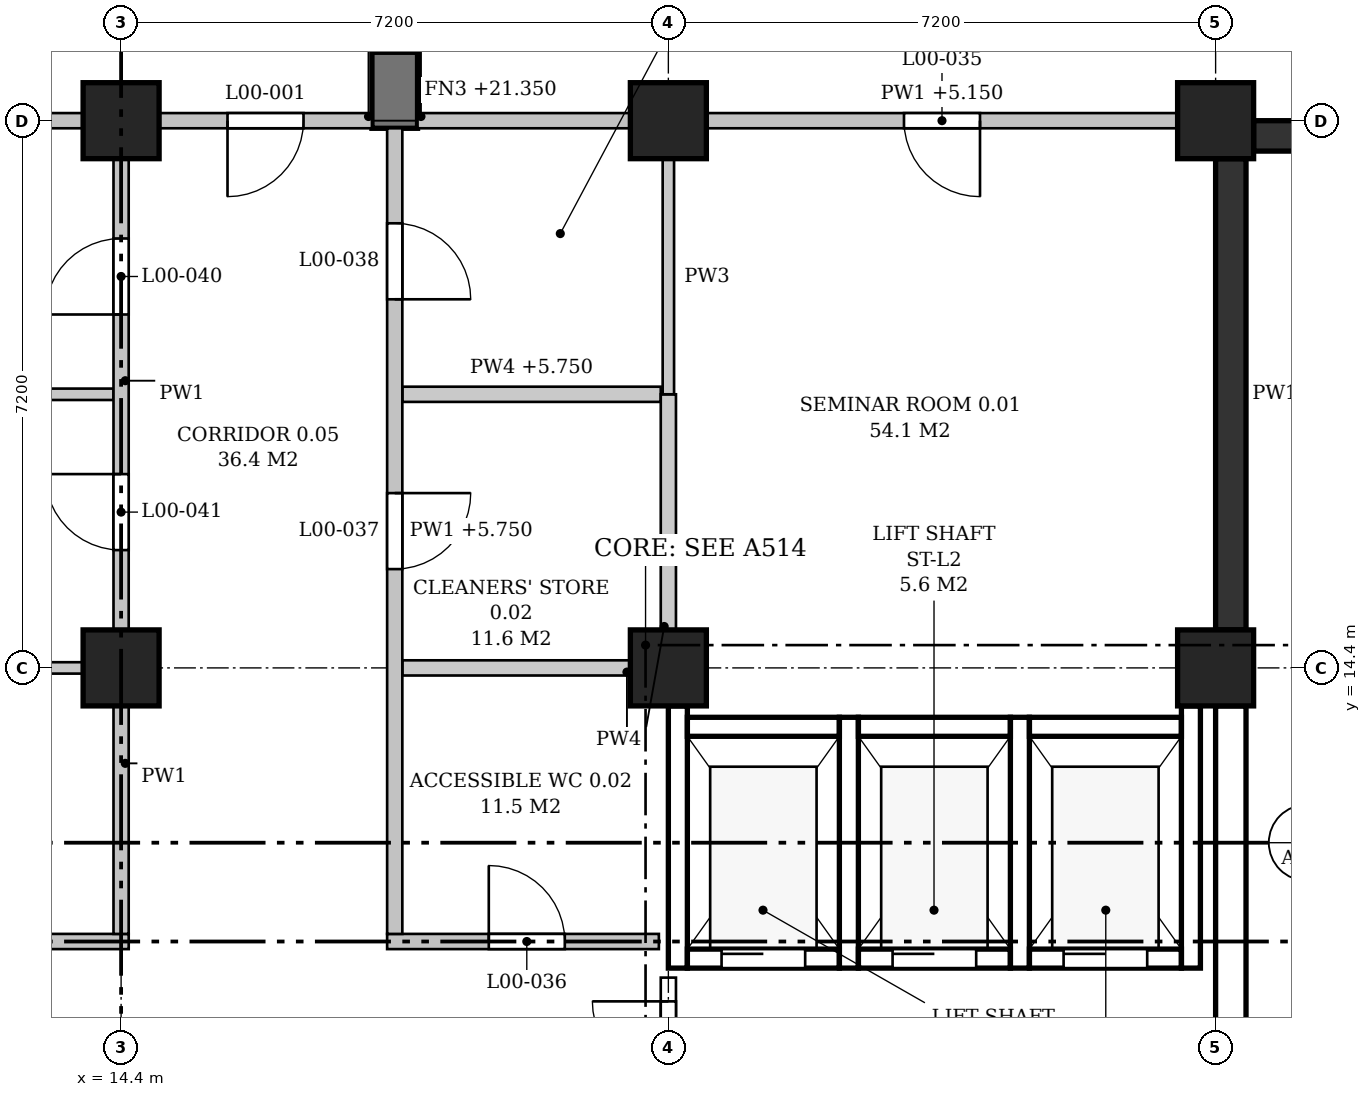
"""IFC4 building model, lengths in metres.
Left out: names, types, materials, properties, quantities, classifications, styles, units other than length and angle.
Written with IfcOpenShell. Run it as: python <this file> out.ifc"""

import sys

from ifc_helpers import new_model, si_unit, direction, frame, frame_2d, origin, origin_2d, place, context, subcontext, project, spatial, polyline, rectangle, outline, extrude, element, fill, save


model = new_model("IFC4")
c1 = context("Model", 3, precision=1e-05, world=origin(), true_north=direction((0.0, 1.0)))
c2 = subcontext(c1, "Body", "Model", "MODEL_VIEW")
j1 = project(units=[si_unit("LENGTHUNIT", "METRE"), si_unit("PLANEANGLEUNIT", "RADIAN")], contexts=[c1])
p1 = place(None, origin())
s1 = spatial("IfcSite", under=j1, at=p1, CompositionType="ELEMENT")
p2 = place(p1, origin())
s2 = spatial("IfcBuilding", under=s1, at=p2, CompositionType="ELEMENT")
p3 = place(p2, origin())
s3 = spatial("IfcBuildingStorey", under=s2, at=p3, CompositionType="ELEMENT", Elevation=0.0)
for number, where, z_axis, x_axis in (
    (1, (14.4, 14.4, 0.0), (0.0, 0.0, 1.0), (1.0, 0.0, 0.0)),
    (2, (14.4, 21.6, 0.0), (0.0, 0.0, 1.0), (1.0, 0.0, 0.0)),
    (3, (21.6, 14.4, 0.0), (0.0, 0.0, 1.0), (1.0, 0.0, 0.0)),
    (4, (21.6, 21.6, 0.0), (0.0, 0.0, 1.0), (1.0, 0.0, 0.0)),
    (5, (28.8, 14.4, 0.0), (0.0, 0.0, 1.0), (1.0, 0.0, 0.0)),
    (6, (28.8, 21.6, 0.0), (0.0, 0.0, 1.0), (1.0, 0.0, 0.0)),
):
    element("IfcColumn", number, at=place(p3, frame(where, z_axis=z_axis, x_axis=x_axis)), inside=s3, PredefinedType="COLUMN", context=c2, shape_type="SweptSolid", body=[
        extrude(rectangle(XDim=1.0, YDim=1.0, at=origin_2d()), origin(), (0.0, 0.0, 1.0), 6.0),
    ])
p4 = place(p3, frame((18.0, 21.5, 0.0), z_axis=(0.0, 0.0, 1.0), x_axis=(0.0, 1.0, 0.0)))
e7 = element("IfcWall", 7, at=p4, inside=s3, PredefinedType="POLYGONAL", context=c2, shape_type="SweptSolid", body=[
    extrude(outline(polyline([(1.0, 0.0), (1.0, 20.975), (0.75, 21.35), (0.35, 21.35), (0.35, 20.75), (0.0, 20.75), (0.0, 16.8), (0.35, 16.8), (0.35, 15.95), (0.0, 15.95), (0.0, 11.4), (0.35, 11.4), (0.35, 10.55), (0.0, 10.55), (0.0, 6.0), (0.35, 6.0), (0.35, 0.0), (1.0, 0.0)])), frame((0.0, 0.3, 0.0), z_axis=(0.0, -1.0, 0.0), x_axis=(1.0, 0.0, 0.0)), (0.0, 0.0, 1.0), 0.6),
])
p5 = place(p3, frame((21.725, 10.45, -0.3), z_axis=(0.0, 0.0, 1.0), x_axis=(0.0, 1.0, 0.0)))
e8 = element("IfcWall", 8, at=p5, inside=s3, PredefinedType="SHEAR", context=c2, shape_type="SweptSolid", body=[
    extrude(rectangle(XDim=3.45, YDim=0.25, at=frame_2d((1.725, 0.0))), origin(), (0.0, 0.0, 1.0), 5.3),
])
for number, where, z_axis, x_axis in (
    (9, (23.975, 10.45, -0.3), (0.0, 0.0, 1.0), (0.0, 1.0, 0.0)),
    (10, (26.225, 10.45, -0.3), (0.0, 0.0, 1.0), (0.0, 1.0, 0.0)),
):
    element("IfcWall", number, at=place(p3, frame(where, z_axis=z_axis, x_axis=x_axis)), inside=s3, PredefinedType="SHEAR", context=c2, shape_type="SweptSolid", body=[
        extrude(rectangle(XDim=3.3, YDim=0.25, at=frame_2d((1.65, 0.0))), origin(), (0.0, 0.0, 1.0), 6.05),
    ])
p6 = place(p3, frame((28.475, 10.45, -0.3), z_axis=(0.0, 0.0, 1.0), x_axis=(0.0, 1.0, 0.0)))
e11 = element("IfcWall", 11, at=p6, inside=s3, PredefinedType="SHEAR", context=c2, shape_type="SweptSolid", body=[
    extrude(rectangle(XDim=3.45, YDim=0.25, at=frame_2d((1.725, 0.0))), origin(), (0.0, 0.0, 1.0), 5.35),
])
p7 = place(p3, frame((21.85, 10.575, -0.3), z_axis=(0.0, 0.0, 1.0), x_axis=(1.0, 0.0, 0.0)))
e12 = element("IfcWall", 12, at=p7, inside=s3, PredefinedType="SHEAR", context=c2, shape_type="SweptSolid", body=[
    extrude(rectangle(XDim=2.0, YDim=0.25, at=frame_2d((1.0, 0.0))), origin(), (0.0, 0.0, 1.0), 6.05),
])
p8 = place(p7, frame((0.45, 0.0, 0.3)))
e13 = element("IfcOpeningElement", 13, at=p8, cuts=e12, PredefinedType="OPENING", context=c2, shape_type="SweptSolid", body=[
    extrude(rectangle(XDim=1.1, YDim=2.1, at=frame_2d((0.55, 1.05))), frame((0.0, 0.135, 0.0), z_axis=(0.0, -1.0, 0.0), x_axis=(1.0, 0.0, 0.0)), (0.0, 0.0, 1.0), 0.27),
])
p9 = place(p3, frame((21.85, 13.625, -0.3), z_axis=(0.0, 0.0, 1.0), x_axis=(1.0, 0.0, 0.0)))
e14 = element("IfcWall", 14, at=p9, inside=s3, PredefinedType="SHEAR", context=c2, shape_type="SweptSolid", body=[
    extrude(rectangle(XDim=2.0, YDim=0.25, at=frame_2d((1.0, 0.0))), origin(), (0.0, 0.0, 1.0), 6.05),
])
p10 = place(p3, frame((24.1, 10.575, -0.3), z_axis=(0.0, 0.0, 1.0), x_axis=(1.0, 0.0, 0.0)))
e15 = element("IfcWall", 15, at=p10, inside=s3, PredefinedType="SHEAR", context=c2, shape_type="SweptSolid", body=[
    extrude(rectangle(XDim=2.0, YDim=0.25, at=frame_2d((1.0, 0.0))), origin(), (0.0, 0.0, 1.0), 6.05),
])
p11 = place(p10, frame((0.45, 0.0, 0.3)))
e16 = element("IfcOpeningElement", 16, at=p11, cuts=e15, PredefinedType="OPENING", context=c2, shape_type="SweptSolid", body=[
    extrude(rectangle(XDim=1.1, YDim=2.1, at=frame_2d((0.55, 1.05))), frame((0.0, 0.135, 0.0), z_axis=(0.0, -1.0, 0.0), x_axis=(1.0, 0.0, 0.0)), (0.0, 0.0, 1.0), 0.27),
])
p12 = place(p3, frame((24.1, 13.625, -0.3), z_axis=(0.0, 0.0, 1.0), x_axis=(1.0, 0.0, 0.0)))
e17 = element("IfcWall", 17, at=p12, inside=s3, PredefinedType="SHEAR", context=c2, shape_type="SweptSolid", body=[
    extrude(rectangle(XDim=2.0, YDim=0.25, at=frame_2d((1.0, 0.0))), origin(), (0.0, 0.0, 1.0), 6.05),
])
p13 = place(p3, frame((26.35, 10.575, -0.3), z_axis=(0.0, 0.0, 1.0), x_axis=(1.0, 0.0, 0.0)))
e18 = element("IfcWall", 18, at=p13, inside=s3, PredefinedType="SHEAR", context=c2, shape_type="SweptSolid", body=[
    extrude(rectangle(XDim=2.0, YDim=0.25, at=frame_2d((1.0, 0.0))), origin(), (0.0, 0.0, 1.0), 6.05),
])
p14 = place(p13, frame((0.45, 0.0, 0.3)))
e19 = element("IfcOpeningElement", 19, at=p14, cuts=e18, PredefinedType="OPENING", context=c2, shape_type="SweptSolid", body=[
    extrude(rectangle(XDim=1.1, YDim=2.1, at=frame_2d((0.55, 1.05))), frame((0.0, 0.135, 0.0), z_axis=(0.0, -1.0, 0.0), x_axis=(1.0, 0.0, 0.0)), (0.0, 0.0, 1.0), 0.27),
])
p15 = place(p3, frame((26.35, 13.625, -0.3), z_axis=(0.0, 0.0, 1.0), x_axis=(1.0, 0.0, 0.0)))
e20 = element("IfcWall", 20, at=p15, inside=s3, PredefinedType="SHEAR", context=c2, shape_type="SweptSolid", body=[
    extrude(rectangle(XDim=2.0, YDim=0.25, at=frame_2d((1.0, 0.0))), origin(), (0.0, 0.0, 1.0), 6.05),
])
p16 = place(p3, frame((7.35, 10.8, 0.0), z_axis=(0.0, 0.0, 1.0), x_axis=(1.0, 0.0, 0.0)))
e21 = element("IfcWall", 21, at=p16, inside=s3, PredefinedType="PARTITIONING", context=c2, shape_type="SweptSolid", body=[
    extrude(outline(polyline([(0.0, 0.0), (7.15, 0.0), (7.15, 5.0), (6.8, 5.0), (6.8, 5.75), (0.1, 5.75), (0.1, 5.0), (0.0, 5.0), (0.0, 0.0)])), frame((0.0, 0.1, 0.0), z_axis=(0.0, -1.0, 0.0), x_axis=(1.0, 0.0, 0.0)), (0.0, 0.0, 1.0), 0.2),
])
p17 = place(p16, frame((2.525, 0.0, 0.0)))
e22 = element("IfcOpeningElement", 22, at=p17, cuts=e21, PredefinedType="OPENING", context=c2, shape_type="SweptSolid", body=[
    extrude(rectangle(XDim=2.0, YDim=2.1, at=frame_2d((1.0, 1.05))), frame((0.0, 0.11, 0.0), z_axis=(0.0, -1.0, 0.0), x_axis=(1.0, 0.0, 0.0)), (0.0, 0.0, 1.0), 0.22),
])
p18 = place(p3, frame((17.9, 10.8, 0.0), z_axis=(0.0, 0.0, 1.0), x_axis=(1.0, 0.0, 0.0)))
e23 = element("IfcWall", 23, at=p18, inside=s3, PredefinedType="PARTITIONING", context=c2, shape_type="SweptSolid", body=[
    extrude(outline(polyline([(0.0, 0.0), (3.575, 0.0), (3.575, 5.0), (3.45, 5.0), (3.45, 5.75), (0.0, 5.75), (0.0, 0.0)])), frame((0.0, 0.1, 0.0), z_axis=(0.0, -1.0, 0.0), x_axis=(1.0, 0.0, 0.0)), (0.0, 0.0, 1.0), 0.2),
])
p19 = place(p18, frame((1.338, 0.0, 0.0)))
e24 = element("IfcOpeningElement", 24, at=p19, cuts=e23, PredefinedType="OPENING", context=c2, shape_type="SweptSolid", body=[
    extrude(rectangle(XDim=1.0, YDim=2.1, at=frame_2d((0.5, 1.05))), frame((0.0, 0.11, 0.0), z_axis=(0.0, -1.0, 0.0), x_axis=(1.0, 0.0, 0.0)), (0.0, 0.0, 1.0), 0.22),
])
p20 = place(p3, frame((7.7, 14.4, 0.0), z_axis=(0.0, 0.0, 1.0), x_axis=(1.0, 0.0, 0.0)))
e25 = element("IfcWall", 25, at=p20, inside=s3, PredefinedType="PARTITIONING", context=c2, shape_type="SweptSolid", body=[
    extrude(rectangle(XDim=6.2, YDim=0.15, at=frame_2d((3.1, 0.0))), origin(), (0.0, 0.0, 1.0), 5.0),
])
p21 = place(p3, frame((18.1, 14.4, 0.0), z_axis=(0.0, 0.0, 1.0), x_axis=(1.0, 0.0, 0.0)))
e26 = element("IfcWall", 26, at=p21, inside=s3, PredefinedType="PARTITIONING", context=c2, shape_type="SweptSolid", body=[
    extrude(rectangle(XDim=3.0, YDim=0.2, at=frame_2d((1.5, 0.0))), origin(), (0.0, 0.0, 1.0), 5.0),
])
p22 = place(p3, frame((7.35, 18.0, 0.0), z_axis=(0.0, 0.0, 1.0), x_axis=(1.0, 0.0, 0.0)))
e27 = element("IfcWall", 27, at=p22, inside=s3, PredefinedType="PARTITIONING", context=c2, shape_type="SweptSolid", body=[
    extrude(rectangle(XDim=6.95, YDim=0.15, at=frame_2d((3.475, 0.0))), origin(), (0.0, 0.0, 1.0), 5.0),
])
p23 = place(p3, frame((18.1, 18.0, 0.0), z_axis=(0.0, 0.0, 1.0), x_axis=(1.0, 0.0, 0.0)))
e28 = element("IfcWall", 28, at=p23, inside=s3, PredefinedType="PARTITIONING", context=c2, shape_type="SweptSolid", body=[
    extrude(outline(polyline([(0.0, 0.0), (3.4, 0.0), (3.4, 5.0), (3.25, 5.0), (3.25, 5.75), (0.0, 5.75), (0.0, 0.0)])), frame((0.0, 0.1, 0.0), z_axis=(0.0, -1.0, 0.0), x_axis=(1.0, 0.0, 0.0)), (0.0, 0.0, 1.0), 0.2),
])
p24 = place(p3, frame((29.3, 21.4, 0.0), z_axis=(0.0, 0.0, 1.0), x_axis=(1.0, 0.0, 0.0)))
e29 = element("IfcWall", 29, at=p24, inside=s3, PredefinedType="SOLIDWALL", context=c2, shape_type="SweptSolid", body=[
    extrude(rectangle(XDim=6.275, YDim=0.4, at=frame_2d((3.137, 0.0))), origin(), (0.0, 0.0, 1.0), 10.7),
])
p25 = place(p3, frame((11.1, 21.6, 0.0), z_axis=(0.0, 0.0, 1.0), x_axis=(1.0, 0.0, 0.0)))
e30 = element("IfcWall", 30, at=p25, inside=s3, PredefinedType="PARTITIONING", context=c2, shape_type="SweptSolid", body=[
    extrude(rectangle(XDim=2.8, YDim=0.2, at=frame_2d((1.4, 0.0))), origin(), (0.0, 0.0, 1.0), 5.15),
])
p26 = place(p3, frame((14.9, 21.6, 0.0), z_axis=(0.0, 0.0, 1.0), x_axis=(1.0, 0.0, 0.0)))
e31 = element("IfcWall", 31, at=p26, inside=s3, PredefinedType="PARTITIONING", context=c2, shape_type="SweptSolid", body=[
    extrude(rectangle(XDim=2.8, YDim=0.2, at=frame_2d((1.4, 0.0))), origin(), (0.0, 0.0, 1.0), 5.15),
])
p27 = place(p26, frame((0.9, 0.0, 0.0)))
e32 = element("IfcOpeningElement", 32, at=p27, cuts=e31, PredefinedType="OPENING", context=c2, shape_type="SweptSolid", body=[
    extrude(rectangle(XDim=1.0, YDim=2.1, at=frame_2d((0.5, 1.05))), frame((0.0, 0.11, 0.0), z_axis=(0.0, -1.0, 0.0), x_axis=(1.0, 0.0, 0.0)), (0.0, 0.0, 1.0), 0.22),
])
p28 = place(p3, frame((18.3, 21.6, 0.0), z_axis=(0.0, 0.0, 1.0), x_axis=(1.0, 0.0, 0.0)))
e33 = element("IfcWall", 33, at=p28, inside=s3, PredefinedType="PARTITIONING", context=c2, shape_type="SweptSolid", body=[
    extrude(rectangle(XDim=2.8, YDim=0.2, at=frame_2d((1.4, 0.0))), origin(), (0.0, 0.0, 1.0), 5.15),
])
p29 = place(p3, frame((22.1, 21.6, 0.0), z_axis=(0.0, 0.0, 1.0), x_axis=(1.0, 0.0, 0.0)))
e34 = element("IfcWall", 34, at=p29, inside=s3, PredefinedType="PARTITIONING", context=c2, shape_type="SweptSolid", body=[
    extrude(rectangle(XDim=6.2, YDim=0.2, at=frame_2d((3.1, 0.0))), origin(), (0.0, 0.0, 1.0), 5.15),
])
p30 = place(p29, frame((2.6, 0.0, 0.0)))
e35 = element("IfcOpeningElement", 35, at=p30, cuts=e34, PredefinedType="OPENING", context=c2, shape_type="SweptSolid", body=[
    extrude(rectangle(XDim=1.0, YDim=2.1, at=frame_2d((0.5, 1.05))), frame((0.0, 0.11, 0.0), z_axis=(0.0, -1.0, 0.0), x_axis=(1.0, 0.0, 0.0)), (0.0, 0.0, 1.0), 0.22),
])
p31 = place(p3, frame((14.4, 10.9, 0.0), z_axis=(0.0, 0.0, 1.0), x_axis=(0.0, 1.0, 0.0)))
e36 = element("IfcWall", 36, at=p31, inside=s3, PredefinedType="PARTITIONING", context=c2, shape_type="SweptSolid", body=[
    extrude(rectangle(XDim=3.0, YDim=0.2, at=frame_2d((1.5, 0.0))), origin(), (0.0, 0.0, 1.0), 5.0),
])
p32 = place(p3, frame((14.4, 14.9, 0.0), z_axis=(0.0, 0.0, 1.0), x_axis=(0.0, 1.0, 0.0)))
e37 = element("IfcWall", 37, at=p32, inside=s3, PredefinedType="PARTITIONING", context=c2, shape_type="SweptSolid", body=[
    extrude(rectangle(XDim=6.2, YDim=0.2, at=frame_2d((3.1, 0.0))), origin(), (0.0, 0.0, 1.0), 5.0),
])
p33 = place(p32, frame((4.15, 0.0, 0.0)))
e38 = element("IfcOpeningElement", 38, at=p33, cuts=e37, PredefinedType="OPENING", context=c2, shape_type="SweptSolid", body=[
    extrude(rectangle(XDim=1.0, YDim=2.1, at=frame_2d((0.5, 1.05))), frame((0.0, 0.11, 0.0), z_axis=(0.0, -1.0, 0.0), x_axis=(1.0, 0.0, 0.0)), (0.0, 0.0, 1.0), 0.22),
])
p34 = place(p32, frame((1.05, 0.0, 0.0)))
e39 = element("IfcOpeningElement", 39, at=p34, cuts=e37, PredefinedType="OPENING", context=c2, shape_type="SweptSolid", body=[
    extrude(rectangle(XDim=1.0, YDim=2.1, at=frame_2d((0.5, 1.05))), frame((0.0, 0.11, 0.0), z_axis=(0.0, -1.0, 0.0), x_axis=(1.0, 0.0, 0.0)), (0.0, 0.0, 1.0), 0.22),
])
p35 = place(p3, frame((18.0, 10.9, 0.0), z_axis=(0.0, 0.0, 1.0), x_axis=(0.0, 1.0, 0.0)))
e40 = element("IfcWall", 40, at=p35, inside=s3, PredefinedType="PARTITIONING", context=c2, shape_type="SweptSolid", body=[
    extrude(outline(polyline([(0.0, 0.0), (10.6, 0.0), (10.6, 5.15), (10.45, 5.15), (10.45, 5.75), (3.75, 5.75), (3.75, 5.0), (3.25, 5.0), (3.25, 5.75), (0.0, 5.75), (0.0, 0.0)])), frame((0.0, 0.1, 0.0), z_axis=(0.0, -1.0, 0.0), x_axis=(1.0, 0.0, 0.0)), (0.0, 0.0, 1.0), 0.2),
])
p36 = place(p35, frame((4.8, 0.0, 0.0)))
e41 = element("IfcOpeningElement", 41, at=p36, cuts=e40, PredefinedType="OPENING", context=c2, shape_type="SweptSolid", body=[
    extrude(rectangle(XDim=1.0, YDim=2.1, at=frame_2d((0.5, 1.05))), frame((0.0, 0.11, 0.0), z_axis=(0.0, -1.0, 0.0), x_axis=(1.0, 0.0, 0.0)), (0.0, 0.0, 1.0), 0.22),
])
p37 = place(p35, frame((8.35, 0.0, 0.0)))
e42 = element("IfcOpeningElement", 42, at=p37, cuts=e40, PredefinedType="OPENING", context=c2, shape_type="SweptSolid", body=[
    extrude(rectangle(XDim=1.0, YDim=2.1, at=frame_2d((0.5, 1.05))), frame((0.0, 0.11, 0.0), z_axis=(0.0, -1.0, 0.0), x_axis=(1.0, 0.0, 0.0)), (0.0, 0.0, 1.0), 0.22),
])
p38 = place(p3, frame((21.6, 7.7, 0.0), z_axis=(0.0, 0.0, 1.0), x_axis=(0.0, 1.0, 0.0)))
e43 = element("IfcWall", 43, at=p38, inside=s3, PredefinedType="PARTITIONING", context=c2, shape_type="SweptSolid", body=[
    extrude(rectangle(XDim=2.625, YDim=0.2, at=frame_2d((1.312, 0.0))), origin(), (0.0, 0.0, 1.0), 5.0),
])
p39 = place(p38, frame((0.312, 0.0, 0.0)))
e44 = element("IfcOpeningElement", 44, at=p39, cuts=e43, PredefinedType="OPENING", context=c2, shape_type="SweptSolid", body=[
    extrude(rectangle(XDim=2.0, YDim=2.4, at=frame_2d((1.0, 1.2))), frame((0.0, 0.11, 0.0), z_axis=(0.0, -1.0, 0.0), x_axis=(1.0, 0.0, 0.0)), (0.0, 0.0, 1.0), 0.22),
])
p40 = place(p3, frame((21.6, 14.9, 0.0), z_axis=(0.0, 0.0, 1.0), x_axis=(0.0, 1.0, 0.0)))
e45 = element("IfcWall", 45, at=p40, inside=s3, PredefinedType="PARTITIONING", context=c2, shape_type="SweptSolid", body=[
    extrude(rectangle(XDim=3.1, YDim=0.2, at=frame_2d((1.55, 0.0))), origin(), (0.0, 0.0, 1.0), 5.0),
])
p41 = place(p3, frame((21.6, 18.0, 0.0), z_axis=(0.0, 0.0, 1.0), x_axis=(0.0, 1.0, 0.0)))
e46 = element("IfcWall", 46, at=p41, inside=s3, PredefinedType="PARTITIONING", context=c2, shape_type="SweptSolid", body=[
    extrude(rectangle(XDim=3.1, YDim=0.15, at=frame_2d((1.55, 0.0))), origin(), (0.0, 0.0, 1.0), 5.0),
])
p42 = place(p3, frame((29.0, 7.7, 0.0), z_axis=(0.0, 0.0, 1.0), x_axis=(0.0, 1.0, 0.0)))
e47 = element("IfcWall", 47, at=p42, inside=s3, PredefinedType="SOLIDWALL", context=c2, shape_type="SweptSolid", body=[
    extrude(rectangle(XDim=6.2, YDim=0.4, at=frame_2d((3.1, 0.0))), origin(), (0.0, 0.0, 1.0), 10.55),
])
p43 = place(p3, frame((29.0, 14.9, 0.0), z_axis=(0.0, 0.0, 1.0), x_axis=(0.0, 1.0, 0.0)))
e48 = element("IfcWall", 48, at=p43, inside=s3, PredefinedType="SOLIDWALL", context=c2, shape_type="SweptSolid", body=[
    extrude(rectangle(XDim=6.2, YDim=0.4, at=frame_2d((3.1, 0.0))), origin(), (0.0, 0.0, 1.0), 10.55),
])
p44 = place(p8, origin())
e49 = element("IfcDoor", 49, at=p44, inside=s3, OperationType="SLIDING_TO_LEFT", PredefinedType="DOOR", context=c2, shape_type="SweptSolid", body=[
    extrude(rectangle(XDim=1.1, YDim=2.1, at=frame_2d((0.55, 1.05))), frame((0.0, 0.025, 0.0), z_axis=(0.0, -1.0, 0.0), x_axis=(1.0, 0.0, 0.0)), (0.0, 0.0, 1.0), 0.05),
])
fill(e13, e49)
p45 = place(p11, origin())
e50 = element("IfcDoor", 50, at=p45, inside=s3, OperationType="SLIDING_TO_LEFT", PredefinedType="DOOR", context=c2, shape_type="SweptSolid", body=[
    extrude(rectangle(XDim=1.1, YDim=2.1, at=frame_2d((0.55, 1.05))), frame((0.0, 0.025, 0.0), z_axis=(0.0, -1.0, 0.0), x_axis=(1.0, 0.0, 0.0)), (0.0, 0.0, 1.0), 0.05),
])
fill(e16, e50)
p46 = place(p14, origin())
e51 = element("IfcDoor", 51, at=p46, inside=s3, OperationType="SLIDING_TO_LEFT", PredefinedType="DOOR", context=c2, shape_type="SweptSolid", body=[
    extrude(rectangle(XDim=1.1, YDim=2.1, at=frame_2d((0.55, 1.05))), frame((0.0, 0.025, 0.0), z_axis=(0.0, -1.0, 0.0), x_axis=(1.0, 0.0, 0.0)), (0.0, 0.0, 1.0), 0.05),
])
fill(e19, e51)
p47 = place(p27, frame((1.0, 0.0, 0.0), z_axis=(0.0, 0.0, 1.0), x_axis=(-1.0, 0.0, 0.0)))
e52 = element("IfcDoor", 52, at=p47, inside=s3, OperationType="SINGLE_SWING_RIGHT", PredefinedType="DOOR", context=c2, shape_type="SweptSolid", body=[
    extrude(rectangle(XDim=1.0, YDim=2.1, at=frame_2d((0.5, 1.05))), frame((0.0, 0.025, 0.0), z_axis=(0.0, -1.0, 0.0), x_axis=(1.0, 0.0, 0.0)), (0.0, 0.0, 1.0), 0.05),
])
fill(e32, e52)
p48 = place(p39, origin())
e53 = element("IfcDoor", 53, at=p48, inside=s3, OperationType="DOUBLE_DOOR_SINGLE_SWING", PredefinedType="DOOR", context=c2, shape_type="SweptSolid", body=[
    extrude(rectangle(XDim=2.0, YDim=2.4, at=frame_2d((1.0, 1.2))), frame((0.0, 0.025, 0.0), z_axis=(0.0, -1.0, 0.0), x_axis=(1.0, 0.0, 0.0)), (0.0, 0.0, 1.0), 0.05),
])
fill(e44, e53)
p49 = place(p30, frame((1.0, 0.0, 0.0), z_axis=(0.0, 0.0, 1.0), x_axis=(-1.0, 0.0, 0.0)))
e54 = element("IfcDoor", 54, at=p49, inside=s3, OperationType="SINGLE_SWING_LEFT", PredefinedType="DOOR", context=c2, shape_type="SweptSolid", body=[
    extrude(rectangle(XDim=1.0, YDim=2.1, at=frame_2d((0.5, 1.05))), frame((0.0, 0.025, 0.0), z_axis=(0.0, -1.0, 0.0), x_axis=(1.0, 0.0, 0.0)), (0.0, 0.0, 1.0), 0.05),
])
fill(e35, e54)
p50 = place(p19, origin())
e55 = element("IfcDoor", 55, at=p50, inside=s3, OperationType="SINGLE_SWING_LEFT", PredefinedType="DOOR", context=c2, shape_type="SweptSolid", body=[
    extrude(rectangle(XDim=1.0, YDim=2.1, at=frame_2d((0.5, 1.05))), frame((0.0, 0.025, 0.0), z_axis=(0.0, -1.0, 0.0), x_axis=(1.0, 0.0, 0.0)), (0.0, 0.0, 1.0), 0.05),
])
fill(e24, e55)
p51 = place(p36, frame((1.0, 0.0, 0.0), z_axis=(0.0, 0.0, 1.0), x_axis=(-1.0, 0.0, 0.0)))
e56 = element("IfcDoor", 56, at=p51, inside=s3, OperationType="SINGLE_SWING_LEFT", PredefinedType="DOOR", context=c2, shape_type="SweptSolid", body=[
    extrude(rectangle(XDim=1.0, YDim=2.1, at=frame_2d((0.5, 1.05))), frame((0.0, 0.025, 0.0), z_axis=(0.0, -1.0, 0.0), x_axis=(1.0, 0.0, 0.0)), (0.0, 0.0, 1.0), 0.05),
])
fill(e41, e56)
p52 = place(p37, frame((1.0, 0.0, 0.0), z_axis=(0.0, 0.0, 1.0), x_axis=(-1.0, 0.0, 0.0)))
e57 = element("IfcDoor", 57, at=p52, inside=s3, OperationType="SINGLE_SWING_RIGHT", PredefinedType="DOOR", context=c2, shape_type="SweptSolid", body=[
    extrude(rectangle(XDim=1.0, YDim=2.1, at=frame_2d((0.5, 1.05))), frame((0.0, 0.025, 0.0), z_axis=(0.0, -1.0, 0.0), x_axis=(1.0, 0.0, 0.0)), (0.0, 0.0, 1.0), 0.05),
])
fill(e42, e57)
p53 = place(p33, origin())
e58 = element("IfcDoor", 58, at=p53, inside=s3, OperationType="SINGLE_SWING_LEFT", PredefinedType="DOOR", context=c2, shape_type="SweptSolid", body=[
    extrude(rectangle(XDim=1.0, YDim=2.1, at=frame_2d((0.5, 1.05))), frame((0.0, 0.025, 0.0), z_axis=(0.0, -1.0, 0.0), x_axis=(1.0, 0.0, 0.0)), (0.0, 0.0, 1.0), 0.05),
])
fill(e38, e58)
p54 = place(p34, origin())
e59 = element("IfcDoor", 59, at=p54, inside=s3, OperationType="SINGLE_SWING_RIGHT", PredefinedType="DOOR", context=c2, shape_type="SweptSolid", body=[
    extrude(rectangle(XDim=1.0, YDim=2.1, at=frame_2d((0.5, 1.05))), frame((0.0, 0.025, 0.0), z_axis=(0.0, -1.0, 0.0), x_axis=(1.0, 0.0, 0.0)), (0.0, 0.0, 1.0), 0.05),
])
fill(e39, e59)
save(model, sys.argv[1])
